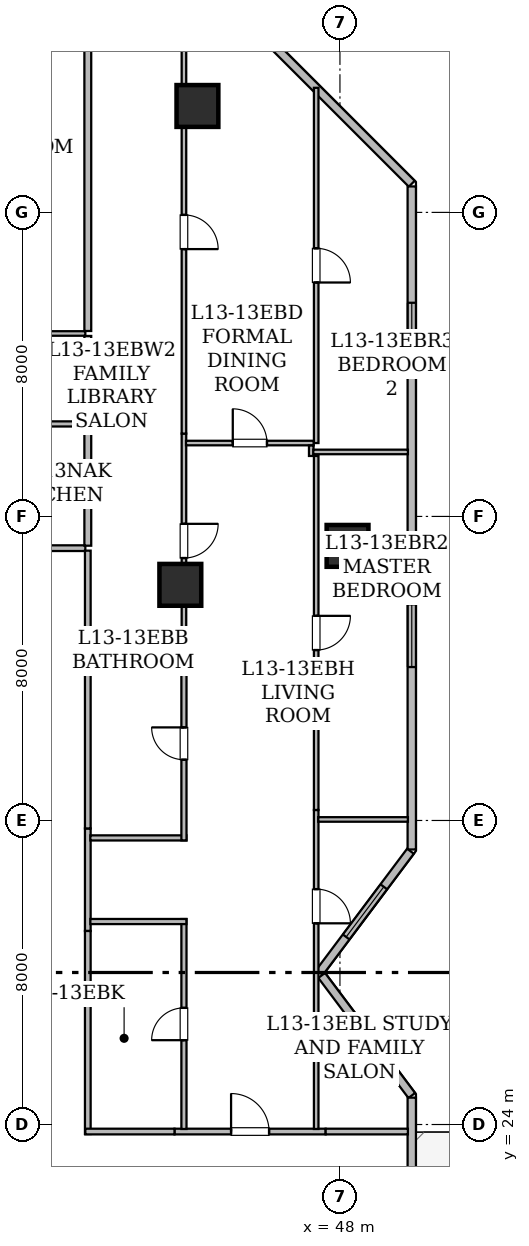
"""IFC4 building model, lengths in metres.
Left out: names, types, materials, properties, quantities, classifications, styles, units other than length and angle.
Written with IfcOpenShell. Run it as: python <this file> out.ifc"""

import sys

from ifc_helpers import new_model, si_unit, direction, frame, frame_2d, origin, origin_2d, place, context, subcontext, project, spatial, rectangle, hollow_rectangle, extrude, element, fill, save


model = new_model("IFC4")
c1 = context("Model", 3, precision=1e-05, world=origin(), true_north=direction((0.0, 1.0)))
c2 = subcontext(c1, "Body", "Model", "MODEL_VIEW")
j1 = project(units=[si_unit("LENGTHUNIT", "METRE"), si_unit("PLANEANGLEUNIT", "RADIAN")], contexts=[c1])
p1 = place(None, origin())
s1 = spatial("IfcSite", under=j1, at=p1, CompositionType="ELEMENT")
p2 = place(p1, origin())
s2 = spatial("IfcBuilding", under=s1, at=p2, CompositionType="ELEMENT")
p3 = place(p2, frame((0.0, 0.0, 55.2)))
s3 = spatial("IfcBuildingStorey", under=s2, at=p3, CompositionType="ELEMENT", Elevation=55.2)
for number, where, z_axis, x_axis in (
    (1, (44.25, 50.8, 0.0), (0.0, 0.0, 1.0), (1.0, 0.0, 0.0)),
    (2, (48.2, 39.225, 0.0), (0.0, 0.0, 1.0), (1.0, 0.0, 0.0)),
    (3, (43.8, 38.2, 0.0), (0.0, 0.0, 1.0), (1.0, 0.0, 0.0)),
):
    element("IfcColumn", number, at=place(p3, frame(where, z_axis=z_axis, x_axis=x_axis)), inside=s3, PredefinedType="COLUMN", context=c2, shape_type="SweptSolid", body=[
        extrude(hollow_rectangle(XDim=1.1, YDim=1.1, WallThickness=0.055, at=origin_2d()), origin(), (0.0, 0.0, 1.0), 3.65),
    ])
p4 = place(p3, frame((45.802, 52.842, 0.0), z_axis=(0.0, 0.0, 1.0), x_axis=(0.707085666273, -0.70712789547, 0.0)))
e4 = element("IfcWall", 4, at=p4, inside=s3, PredefinedType="STANDARD", context=c2, shape_type="SweptSolid", body=[
    extrude(rectangle(XDim=5.781, YDim=0.22, at=frame_2d((2.891, 0.0))), origin(), (0.0, 0.0, 1.0), 3.43),
])
p5 = place(p3, frame((49.89, 48.683, 0.0), z_axis=(0.0, 0.0, 1.0), x_axis=(0.0, -1.0, 0.0)))
e5 = element("IfcWall", 5, at=p5, inside=s3, PredefinedType="STANDARD", context=c2, shape_type="SweptSolid", body=[
    extrude(rectangle(XDim=17.446, YDim=0.22, at=frame_2d((8.723, 0.0))), origin(), (0.0, 0.0, 1.0), 3.43),
])
p6 = place(p5, frame((10.996, 0.0, 0.85)))
e6 = element("IfcOpeningElement", 6, at=p6, cuts=e5, PredefinedType="OPENING", context=c2, shape_type="SweptSolid", body=[
    extrude(rectangle(XDim=1.65, YDim=1.55, at=frame_2d((0.825, 0.775))), frame((0.0, 0.12, 0.0), z_axis=(0.0, -1.0, 0.0), x_axis=(1.0, 0.0, 0.0)), (0.0, 0.0, 1.0), 0.24),
])
p7 = place(p5, frame((3.061, 0.0, 0.85)))
e7 = element("IfcOpeningElement", 7, at=p7, cuts=e5, PredefinedType="OPENING", context=c2, shape_type="SweptSolid", body=[
    extrude(rectangle(XDim=1.65, YDim=1.55, at=frame_2d((0.825, 0.775))), frame((0.0, 0.12, 0.0), z_axis=(0.0, -1.0, 0.0), x_axis=(1.0, 0.0, 0.0)), (0.0, 0.0, 1.0), 0.24),
])
p8 = place(p3, frame((49.856, 31.191, 0.0), z_axis=(0.0, 0.0, 1.0), x_axis=(-0.600137081448, -0.799897170561, 0.0)))
e8 = element("IfcWall", 8, at=p8, inside=s3, PredefinedType="STANDARD", context=c2, shape_type="SweptSolid", body=[
    extrude(rectangle(XDim=3.989, YDim=0.22, at=frame_2d((1.995, 0.0))), origin(), (0.0, 0.0, 1.0), 3.43),
])
p9 = place(p8, frame((1.17, 0.0, 0.85)))
e9 = element("IfcOpeningElement", 9, at=p9, cuts=e8, PredefinedType="OPENING", context=c2, shape_type="SweptSolid", body=[
    extrude(rectangle(XDim=1.65, YDim=1.55, at=frame_2d((0.825, 0.775))), frame((0.0, 0.12, 0.0), z_axis=(0.0, -1.0, 0.0), x_axis=(1.0, 0.0, 0.0)), (0.0, 0.0, 1.0), 0.24),
])
p10 = place(p3, frame((47.519, 27.923, 0.0), z_axis=(0.0, 0.0, 1.0), x_axis=(0.600118645218, -0.799911002338, 0.0)))
e10 = element("IfcWall", 10, at=p10, inside=s3, PredefinedType="STANDARD", context=c2, shape_type="SweptSolid", body=[
    extrude(rectangle(XDim=3.951, YDim=0.22, at=frame_2d((1.975, 0.0))), origin(), (0.0, 0.0, 1.0), 3.43),
])
p11 = place(p3, frame((49.89, 24.707, 0.0), z_axis=(0.0, 0.0, 1.0), x_axis=(0.0, -1.0, 0.0)))
e11 = element("IfcWall", 11, at=p11, inside=s3, PredefinedType="STANDARD", context=c2, shape_type="SweptSolid", body=[
    extrude(rectangle(XDim=17.461, YDim=0.22, at=frame_2d((8.73, 0.0))), origin(), (0.0, 0.0, 1.0), 3.43),
])
p12 = place(p11, frame((5.311, 0.0, 0.0)))
e12 = element("IfcOpeningElement", 12, at=p12, cuts=e11, PredefinedType="OPENING", context=c2, shape_type="SweptSolid", body=[
    extrude(rectangle(XDim=1.1, YDim=2.2, at=frame_2d((0.55, 1.1))), frame((0.0, 0.12, 0.0), z_axis=(0.0, -1.0, 0.0), x_axis=(1.0, 0.0, 0.0)), (0.0, 0.0, 1.0), 0.24),
])
p13 = place(p11, frame((6.942, 0.0, 0.8)))
e13 = element("IfcOpeningElement", 13, at=p13, cuts=e11, PredefinedType="OPENING", context=c2, shape_type="SweptSolid", body=[
    extrude(rectangle(XDim=1.2, YDim=1.5, at=frame_2d((0.6, 0.75))), frame((0.0, 0.12, 0.0), z_axis=(0.0, -1.0, 0.0), x_axis=(1.0, 0.0, 0.0)), (0.0, 0.0, 1.0), 0.24),
])
p14 = place(p11, frame((11.679, 0.0, 0.85)))
e14 = element("IfcOpeningElement", 14, at=p14, cuts=e11, PredefinedType="OPENING", context=c2, shape_type="SweptSolid", body=[
    extrude(rectangle(XDim=1.65, YDim=1.55, at=frame_2d((0.825, 0.775))), frame((0.0, 0.12, 0.0), z_axis=(0.0, -1.0, 0.0), x_axis=(1.0, 0.0, 0.0)), (0.0, 0.0, 1.0), 0.24),
])
p15 = place(p3, frame((34.299, 39.165, 0.0), z_axis=(0.0, 0.0, 1.0), x_axis=(1.0, 0.0, 0.0)))
e15 = element("IfcWall", 15, at=p15, inside=s3, PredefinedType="STANDARD", context=c2, shape_type="SweptSolid", body=[
    extrude(rectangle(XDim=7.001, YDim=0.15, at=frame_2d((3.5, 0.0))), origin(), (0.0, 0.0, 1.0), 3.43),
])
p16 = place(p3, frame((41.365, 39.1, 0.0), z_axis=(0.0, 0.0, 1.0), x_axis=(0.0, -1.0, 0.0)))
e16 = element("IfcWall", 16, at=p16, inside=s3, PredefinedType="STANDARD", context=c2, shape_type="SweptSolid", body=[
    extrude(rectangle(XDim=2.843, YDim=0.15, at=frame_2d((1.421, 0.0))), origin(), (0.0, 0.0, 1.0), 2.647),
])
p17 = place(p3, frame((41.365, 31.79, 0.0), z_axis=(0.0, 0.0, 1.0), x_axis=(0.0, -1.0, 0.0)))
e17 = element("IfcWall", 17, at=p17, inside=s3, PredefinedType="STANDARD", context=c2, shape_type="SweptSolid", body=[
    extrude(rectangle(XDim=2.698, YDim=0.15, at=frame_2d((1.349, 0.0))), origin(), (0.0, 0.0, 1.0), 3.43),
])
p18 = place(p3, frame((43.646, 23.815, 0.0), z_axis=(0.0, 0.0, 1.0), x_axis=(1.0, 0.0, 0.0)))
e18 = element("IfcWall", 18, at=p18, inside=s3, PredefinedType="STANDARD", context=c2, shape_type="SweptSolid", body=[
    extrude(rectangle(XDim=3.978, YDim=0.15, at=frame_2d((1.989, 0.0))), origin(), (0.0, 0.0, 1.0), 2.647),
])
p19 = place(p18, frame((1.489, 0.0, 0.0)))
e19 = element("IfcOpeningElement", 19, at=p19, cuts=e18, PredefinedType="OPENING", context=c2, shape_type="SweptSolid", body=[
    extrude(rectangle(XDim=1.0, YDim=2.15, at=frame_2d((0.5, 1.075))), frame((0.0, 0.085, 0.0), z_axis=(0.0, -1.0, 0.0), x_axis=(1.0, 0.0, 0.0)), (0.0, 0.0, 1.0), 0.17),
])
p20 = place(p3, frame((41.365, 36.257, 0.0), z_axis=(0.0, 0.0, 1.0), x_axis=(0.0, -1.0, 0.0)))
e20 = element("IfcWall", 20, at=p20, inside=s3, PredefinedType="STANDARD", context=c2, shape_type="SweptSolid", body=[
    extrude(rectangle(XDim=4.467, YDim=0.15, at=frame_2d((2.233, 0.0))), origin(), (0.0, 0.0, 1.0), 3.43),
])
p21 = place(p3, frame((41.365, 29.092, 0.0), z_axis=(0.0, 0.0, 1.0), x_axis=(0.0, -1.0, 0.0)))
e21 = element("IfcWall", 21, at=p21, inside=s3, PredefinedType="STANDARD", context=c2, shape_type="SweptSolid", body=[
    extrude(rectangle(XDim=5.342, YDim=0.15, at=frame_2d((2.671, 0.0))), origin(), (0.0, 0.0, 1.0), 2.957),
])
p22 = place(p3, frame((41.3, 23.815, 0.0), z_axis=(0.0, 0.0, 1.0), x_axis=(1.0, 0.0, 0.0)))
e22 = element("IfcWall", 22, at=p22, inside=s3, PredefinedType="STANDARD", context=c2, shape_type="SweptSolid", body=[
    extrude(rectangle(XDim=2.346, YDim=0.15, at=frame_2d((1.173, 0.0))), origin(), (0.0, 0.0, 1.0), 2.647),
])
p23 = place(p3, frame((47.624, 23.815, 0.0), z_axis=(0.0, 0.0, 1.0), x_axis=(1.0, 0.0, 0.0)))
e23 = element("IfcWall", 23, at=p23, inside=s3, PredefinedType="STANDARD", context=c2, shape_type="SweptSolid", body=[
    extrude(rectangle(XDim=2.164, YDim=0.15, at=frame_2d((1.082, 0.0))), origin(), (0.0, 0.0, 1.0), 2.803),
])
p24 = place(p3, frame((41.3, 42.434, 0.0), z_axis=(0.0, 0.0, 1.0), x_axis=(-1.0, 0.0, 0.0)))
e24 = element("IfcWall", 24, at=p24, inside=s3, PredefinedType="PARTITIONING", context=c2, shape_type="SweptSolid", body=[
    extrude(rectangle(XDim=7.315, YDim=0.135, at=frame_2d((3.657, 0.0))), origin(), (0.0, 0.0, 1.0), 2.957),
])
p25 = place(p24, frame((3.233, 0.0, 0.0)))
e25 = element("IfcOpeningElement", 25, at=p25, cuts=e24, PredefinedType="OPENING", context=c2, shape_type="SweptSolid", body=[
    extrude(rectangle(XDim=0.85, YDim=2.1, at=frame_2d((0.425, 1.05))), frame((0.0, 0.077, 0.0), z_axis=(0.0, -1.0, 0.0), x_axis=(1.0, 0.0, 0.0)), (0.0, 0.0, 1.0), 0.155),
])
p26 = place(p3, frame((34.82, 44.814, 0.0), z_axis=(0.0, 0.0, 1.0), x_axis=(1.0, 0.0, 0.0)))
e26 = element("IfcWall", 26, at=p26, inside=s3, PredefinedType="PARTITIONING", context=c2, shape_type="SweptSolid", body=[
    extrude(rectangle(XDim=6.48, YDim=0.12, at=frame_2d((3.24, 0.0))), origin(), (0.0, 0.0, 1.0), 3.43),
])
p27 = place(p3, frame((41.365, 44.749, 0.0), z_axis=(0.0, 0.0, 1.0), x_axis=(0.0, -1.0, 0.0)))
e27 = element("IfcWall", 27, at=p27, inside=s3, PredefinedType="STANDARD", context=c2, shape_type="SweptSolid", body=[
    extrude(rectangle(XDim=2.25, YDim=0.18, at=frame_2d((1.125, 0.0))), origin(), (0.0, 0.0, 1.0), 2.957),
])
p28 = place(p3, frame((41.365, 42.369, 0.0), z_axis=(0.0, 0.0, 1.0), x_axis=(0.0, -1.0, 0.0)))
e28 = element("IfcWall", 28, at=p28, inside=s3, PredefinedType="STANDARD", context=c2, shape_type="SweptSolid", body=[
    extrude(rectangle(XDim=3.139, YDim=0.18, at=frame_2d((1.569, 0.0))), origin(), (0.0, 0.0, 1.0), 3.43),
])
p29 = place(p3, frame((41.365, 52.788, 0.0), z_axis=(0.0, 0.0, 1.0), x_axis=(0.0, -1.0, 0.0)))
e29 = element("IfcWall", 29, at=p29, inside=s3, PredefinedType="STANDARD", context=c2, shape_type="SweptSolid", body=[
    extrude(rectangle(XDim=7.909, YDim=0.18, at=frame_2d((3.955, 0.0))), origin(), (0.0, 0.0, 1.0), 2.803),
])
p30 = place(p3, frame((43.895, 42.18, 0.0), z_axis=(0.0, 0.0, 1.0), x_axis=(0.0, -1.0, 0.0)))
e30 = element("IfcWall", 30, at=p30, inside=s3, PredefinedType="PARTITIONING", context=c2, shape_type="SweptSolid", body=[
    extrude(rectangle(XDim=5.609, YDim=0.12, at=frame_2d((2.804, 0.0))), origin(), (0.0, 0.0, 1.0), 2.647),
])
p31 = place(p30, frame((2.375, 0.0, 0.0)))
e31 = element("IfcOpeningElement", 31, at=p31, cuts=e30, PredefinedType="OPENING", context=c2, shape_type="SweptSolid", body=[
    extrude(rectangle(XDim=0.9, YDim=2.1, at=frame_2d((0.45, 1.05))), frame((0.0, 0.07, 0.0), z_axis=(0.0, -1.0, 0.0), x_axis=(1.0, 0.0, 0.0)), (0.0, 0.0, 1.0), 0.14),
])
p32 = place(p3, frame((43.895, 52.788, 0.0), z_axis=(0.0, 0.0, 1.0), x_axis=(0.0, -1.0, 0.0)))
e32 = element("IfcWall", 32, at=p32, inside=s3, PredefinedType="PARTITIONING", context=c2, shape_type="SweptSolid", body=[
    extrude(rectangle(XDim=10.608, YDim=0.12, at=frame_2d((5.304, 0.0))), origin(), (0.0, 0.0, 1.0), 2.647),
])
p33 = place(p32, frame((4.854, 0.0, 0.0)))
e33 = element("IfcOpeningElement", 33, at=p33, cuts=e32, PredefinedType="OPENING", context=c2, shape_type="SweptSolid", body=[
    extrude(rectangle(XDim=0.9, YDim=2.1, at=frame_2d((0.45, 1.05))), frame((0.0, 0.07, 0.0), z_axis=(0.0, -1.0, 0.0), x_axis=(1.0, 0.0, 0.0)), (0.0, 0.0, 1.0), 0.14),
])
p34 = place(p3, frame((43.83, 36.506, 0.0), z_axis=(0.0, 0.0, 1.0), x_axis=(-1.0, 0.0, 0.0)))
e34 = element("IfcWall", 34, at=p34, inside=s3, PredefinedType="PARTITIONING", context=c2, shape_type="SweptSolid", body=[
    extrude(rectangle(XDim=2.398, YDim=0.135, at=frame_2d((1.199, 0.0))), origin(), (0.0, 0.0, 1.0), 2.647),
])
p35 = place(p3, frame((43.949, 41.931, 0.0), z_axis=(0.0, 0.0, 1.0), x_axis=(1.0, 0.0, 0.0)))
e35 = element("IfcWall", 35, at=p35, inside=s3, PredefinedType="PARTITIONING", context=c2, shape_type="SweptSolid", body=[
    extrude(rectangle(XDim=3.361, YDim=0.12, at=frame_2d((1.681, 0.0))), origin(), (0.0, 0.0, 1.0), 2.647),
])
p36 = place(p35, frame((1.231, 0.0, 0.0)))
e36 = element("IfcOpeningElement", 36, at=p36, cuts=e35, PredefinedType="OPENING", context=c2, shape_type="SweptSolid", body=[
    extrude(rectangle(XDim=0.9, YDim=2.1, at=frame_2d((0.45, 1.05))), frame((0.0, 0.07, 0.0), z_axis=(0.0, -1.0, 0.0), x_axis=(1.0, 0.0, 0.0)), (0.0, 0.0, 1.0), 0.14),
])
p37 = place(p3, frame((47.245, 41.866, 0.0), z_axis=(0.0, 0.0, 1.0), x_axis=(0.0, -1.0, 0.0)))
e37 = element("IfcWall", 37, at=p37, inside=s3, PredefinedType="PARTITIONING", context=c2, shape_type="SweptSolid", body=[
    extrude(rectangle(XDim=0.275, YDim=0.12, at=frame_2d((0.137, 0.0))), origin(), (0.0, 0.0, 1.0), 2.803),
])
p38 = place(p3, frame((41.432, 31.541, 0.0), z_axis=(0.0, 0.0, 1.0), x_axis=(1.0, 0.0, 0.0)))
e38 = element("IfcWall", 38, at=p38, inside=s3, PredefinedType="PARTITIONING", context=c2, shape_type="SweptSolid", body=[
    extrude(rectangle(XDim=2.528, YDim=0.135, at=frame_2d((1.264, 0.0))), origin(), (0.0, 0.0, 1.0), 2.647),
])
p39 = place(p3, frame((43.895, 31.476, 0.0), z_axis=(0.0, 0.0, 1.0), x_axis=(0.0, 1.0, 0.0)))
e39 = element("IfcWall", 39, at=p39, inside=s3, PredefinedType="PARTITIONING", context=c2, shape_type="SweptSolid", body=[
    extrude(rectangle(XDim=5.095, YDim=0.135, at=frame_2d((2.547, 0.0))), origin(), (0.0, 0.0, 1.0), 2.647),
])
p40 = place(p39, frame((2.123, 0.0, 0.0)))
e40 = element("IfcOpeningElement", 40, at=p40, cuts=e39, PredefinedType="OPENING", context=c2, shape_type="SweptSolid", body=[
    extrude(rectangle(XDim=0.85, YDim=2.1, at=frame_2d((0.425, 1.05))), frame((0.0, 0.077, 0.0), z_axis=(0.0, -1.0, 0.0), x_axis=(1.0, 0.0, 0.0)), (0.0, 0.0, 1.0), 0.155),
])
p41 = place(p3, frame((43.895, 23.882, 0.0), z_axis=(0.0, 0.0, 1.0), x_axis=(0.0, 1.0, 0.0)))
e41 = element("IfcWall", 41, at=p41, inside=s3, PredefinedType="PARTITIONING", context=c2, shape_type="SweptSolid", body=[
    extrude(rectangle(XDim=5.524, YDim=0.135, at=frame_2d((2.762, 0.0))), origin(), (0.0, 0.0, 1.0), 2.647),
])
p42 = place(p41, frame((2.337, 0.0, 0.0)))
e42 = element("IfcOpeningElement", 42, at=p42, cuts=e41, PredefinedType="OPENING", context=c2, shape_type="SweptSolid", body=[
    extrude(rectangle(XDim=0.85, YDim=2.1, at=frame_2d((0.425, 1.05))), frame((0.0, 0.077, 0.0), z_axis=(0.0, -1.0, 0.0), x_axis=(1.0, 0.0, 0.0)), (0.0, 0.0, 1.0), 0.155),
])
p43 = place(p3, frame((43.96, 29.341, 0.0), z_axis=(0.0, 0.0, 1.0), x_axis=(-1.0, 0.0, 0.0)))
e43 = element("IfcWall", 43, at=p43, inside=s3, PredefinedType="PARTITIONING", context=c2, shape_type="SweptSolid", body=[
    extrude(rectangle(XDim=2.528, YDim=0.135, at=frame_2d((1.264, 0.0))), origin(), (0.0, 0.0, 1.0), 2.647),
])
p44 = place(p3, frame((47.375, 32.276, 0.0), z_axis=(0.0, 0.0, 1.0), x_axis=(0.0, -1.0, 0.0)))
e44 = element("IfcWall", 44, at=p44, inside=s3, PredefinedType="PARTITIONING", context=c2, shape_type="SweptSolid", body=[
    extrude(rectangle(XDim=8.394, YDim=0.12, at=frame_2d((4.197, 0.0))), origin(), (0.0, 0.0, 1.0), 2.957),
])
p45 = place(p44, frame((2.082, 0.0, 0.0)))
e45 = element("IfcOpeningElement", 45, at=p45, cuts=e44, PredefinedType="OPENING", context=c2, shape_type="SweptSolid", body=[
    extrude(rectangle(XDim=0.9, YDim=2.1, at=frame_2d((0.45, 1.05))), frame((0.0, 0.07, 0.0), z_axis=(0.0, -1.0, 0.0), x_axis=(1.0, 0.0, 0.0)), (0.0, 0.0, 1.0), 0.14),
])
p46 = place(p3, frame((47.375, 41.591, 0.0), z_axis=(0.0, 0.0, 1.0), x_axis=(0.0, -1.0, 0.0)))
e46 = element("IfcWall", 46, at=p46, inside=s3, PredefinedType="PARTITIONING", context=c2, shape_type="SweptSolid", body=[
    extrude(rectangle(XDim=9.315, YDim=0.12, at=frame_2d((4.658, 0.0))), origin(), (0.0, 0.0, 1.0), 2.647),
])
p47 = place(p46, frame((4.207, 0.0, 0.0)))
e47 = element("IfcOpeningElement", 47, at=p47, cuts=e46, PredefinedType="OPENING", context=c2, shape_type="SweptSolid", body=[
    extrude(rectangle(XDim=0.9, YDim=2.1, at=frame_2d((0.45, 1.05))), frame((0.0, 0.07, 0.0), z_axis=(0.0, -1.0, 0.0), x_axis=(1.0, 0.0, 0.0)), (0.0, 0.0, 1.0), 0.14),
])
p48 = place(p3, frame((47.375, 51.278, 0.0), z_axis=(0.0, 0.0, 1.0), x_axis=(0.0, -1.0, 0.0)))
e48 = element("IfcWall", 48, at=p48, inside=s3, PredefinedType="PARTITIONING", context=c2, shape_type="SweptSolid", body=[
    extrude(rectangle(XDim=9.347, YDim=0.12, at=frame_2d((4.674, 0.0))), origin(), (0.0, 0.0, 1.0), 2.803),
])
p49 = place(p48, frame((4.223, 0.0, 0.0)))
e49 = element("IfcOpeningElement", 49, at=p49, cuts=e48, PredefinedType="OPENING", context=c2, shape_type="SweptSolid", body=[
    extrude(rectangle(XDim=0.9, YDim=2.1, at=frame_2d((0.45, 1.05))), frame((0.0, 0.07, 0.0), z_axis=(0.0, -1.0, 0.0), x_axis=(1.0, 0.0, 0.0)), (0.0, 0.0, 1.0), 0.14),
])
p50 = place(p3, frame((47.429, 32.027, 0.0), z_axis=(0.0, 0.0, 1.0), x_axis=(1.0, 0.0, 0.0)))
e50 = element("IfcWall", 50, at=p50, inside=s3, PredefinedType="PARTITIONING", context=c2, shape_type="SweptSolid", body=[
    extrude(rectangle(XDim=2.359, YDim=0.12, at=frame_2d((1.18, 0.0))), origin(), (0.0, 0.0, 1.0), 2.803),
])
p51 = place(p3, frame((47.299, 41.697, 0.0), z_axis=(0.0, 0.0, 1.0), x_axis=(1.0, 0.0, 0.0)))
e51 = element("IfcWall", 51, at=p51, inside=s3, PredefinedType="PARTITIONING", context=c2, shape_type="SweptSolid", body=[
    extrude(rectangle(XDim=2.489, YDim=0.12, at=frame_2d((1.245, 0.0))), origin(), (0.0, 0.0, 1.0), 2.803),
])
p52 = place(p9, origin())
e52 = element("IfcWindow", 52, at=p52, inside=s3, PartitioningType="SINGLE_PANEL", PredefinedType="WINDOW", context=c2, shape_type="SweptSolid", body=[
    extrude(rectangle(XDim=1.65, YDim=1.55, at=frame_2d((0.825, 0.775))), frame((0.0, 0.03, 0.0), z_axis=(0.0, -1.0, 0.0), x_axis=(1.0, 0.0, 0.0)), (0.0, 0.0, 1.0), 0.06),
])
fill(e9, e52)
p53 = place(p6, origin())
e53 = element("IfcWindow", 53, at=p53, inside=s3, PartitioningType="SINGLE_PANEL", PredefinedType="WINDOW", context=c2, shape_type="SweptSolid", body=[
    extrude(rectangle(XDim=1.65, YDim=1.55, at=frame_2d((0.825, 0.775))), frame((0.0, 0.03, 0.0), z_axis=(0.0, -1.0, 0.0), x_axis=(1.0, 0.0, 0.0)), (0.0, 0.0, 1.0), 0.06),
])
fill(e6, e53)
p54 = place(p7, origin())
e54 = element("IfcWindow", 54, at=p54, inside=s3, PartitioningType="SINGLE_PANEL", PredefinedType="WINDOW", context=c2, shape_type="SweptSolid", body=[
    extrude(rectangle(XDim=1.65, YDim=1.55, at=frame_2d((0.825, 0.775))), frame((0.0, 0.03, 0.0), z_axis=(0.0, -1.0, 0.0), x_axis=(1.0, 0.0, 0.0)), (0.0, 0.0, 1.0), 0.06),
])
fill(e7, e54)
p55 = place(p19, origin())
e55 = element("IfcDoor", 55, at=p55, inside=s3, OperationType="SINGLE_SWING_LEFT", PredefinedType="DOOR", context=c2, shape_type="SweptSolid", body=[
    extrude(rectangle(XDim=1.0, YDim=2.15, at=frame_2d((0.5, 1.075))), frame((0.0, 0.025, 0.0), z_axis=(0.0, -1.0, 0.0), x_axis=(1.0, 0.0, 0.0)), (0.0, 0.0, 1.0), 0.05),
])
fill(e19, e55)
p56 = place(p31, origin())
e56 = element("IfcDoor", 56, at=p56, inside=s3, OperationType="SINGLE_SWING_LEFT", PredefinedType="DOOR", context=c2, shape_type="SweptSolid", body=[
    extrude(rectangle(XDim=0.9, YDim=2.1, at=frame_2d((0.45, 1.05))), frame((0.0, 0.025, 0.0), z_axis=(0.0, -1.0, 0.0), x_axis=(1.0, 0.0, 0.0)), (0.0, 0.0, 1.0), 0.05),
])
fill(e31, e56)
p57 = place(p33, origin())
e57 = element("IfcDoor", 57, at=p57, inside=s3, OperationType="SINGLE_SWING_RIGHT", PredefinedType="DOOR", context=c2, shape_type="SweptSolid", body=[
    extrude(rectangle(XDim=0.9, YDim=2.1, at=frame_2d((0.45, 1.05))), frame((0.0, 0.025, 0.0), z_axis=(0.0, -1.0, 0.0), x_axis=(1.0, 0.0, 0.0)), (0.0, 0.0, 1.0), 0.05),
])
fill(e33, e57)
p58 = place(p36, origin())
e58 = element("IfcDoor", 58, at=p58, inside=s3, OperationType="SINGLE_SWING_LEFT", PredefinedType="DOOR", context=c2, shape_type="SweptSolid", body=[
    extrude(rectangle(XDim=0.9, YDim=2.1, at=frame_2d((0.45, 1.05))), frame((0.0, 0.025, 0.0), z_axis=(0.0, -1.0, 0.0), x_axis=(1.0, 0.0, 0.0)), (0.0, 0.0, 1.0), 0.05),
])
fill(e36, e58)
p59 = place(p40, origin())
e59 = element("IfcDoor", 59, at=p59, inside=s3, OperationType="SINGLE_SWING_RIGHT", PredefinedType="DOOR", context=c2, shape_type="SweptSolid", body=[
    extrude(rectangle(XDim=0.85, YDim=2.1, at=frame_2d((0.425, 1.05))), frame((0.0, 0.025, 0.0), z_axis=(0.0, -1.0, 0.0), x_axis=(1.0, 0.0, 0.0)), (0.0, 0.0, 1.0), 0.05),
])
fill(e40, e59)
p60 = place(p42, origin())
e60 = element("IfcDoor", 60, at=p60, inside=s3, OperationType="SINGLE_SWING_LEFT", PredefinedType="DOOR", context=c2, shape_type="SweptSolid", body=[
    extrude(rectangle(XDim=0.85, YDim=2.1, at=frame_2d((0.425, 1.05))), frame((0.0, 0.025, 0.0), z_axis=(0.0, -1.0, 0.0), x_axis=(1.0, 0.0, 0.0)), (0.0, 0.0, 1.0), 0.05),
])
fill(e42, e60)
p61 = place(p45, origin())
e61 = element("IfcDoor", 61, at=p61, inside=s3, OperationType="SINGLE_SWING_RIGHT", PredefinedType="DOOR", context=c2, shape_type="SweptSolid", body=[
    extrude(rectangle(XDim=0.9, YDim=2.1, at=frame_2d((0.45, 1.05))), frame((0.0, 0.025, 0.0), z_axis=(0.0, -1.0, 0.0), x_axis=(1.0, 0.0, 0.0)), (0.0, 0.0, 1.0), 0.05),
])
fill(e45, e61)
p62 = place(p47, origin())
e62 = element("IfcDoor", 62, at=p62, inside=s3, OperationType="SINGLE_SWING_LEFT", PredefinedType="DOOR", context=c2, shape_type="SweptSolid", body=[
    extrude(rectangle(XDim=0.9, YDim=2.1, at=frame_2d((0.45, 1.05))), frame((0.0, 0.025, 0.0), z_axis=(0.0, -1.0, 0.0), x_axis=(1.0, 0.0, 0.0)), (0.0, 0.0, 1.0), 0.05),
])
fill(e47, e62)
p63 = place(p49, origin())
e63 = element("IfcDoor", 63, at=p63, inside=s3, OperationType="SINGLE_SWING_RIGHT", PredefinedType="DOOR", context=c2, shape_type="SweptSolid", body=[
    extrude(rectangle(XDim=0.9, YDim=2.1, at=frame_2d((0.45, 1.05))), frame((0.0, 0.025, 0.0), z_axis=(0.0, -1.0, 0.0), x_axis=(1.0, 0.0, 0.0)), (0.0, 0.0, 1.0), 0.05),
])
fill(e49, e63)
save(model, sys.argv[1])
